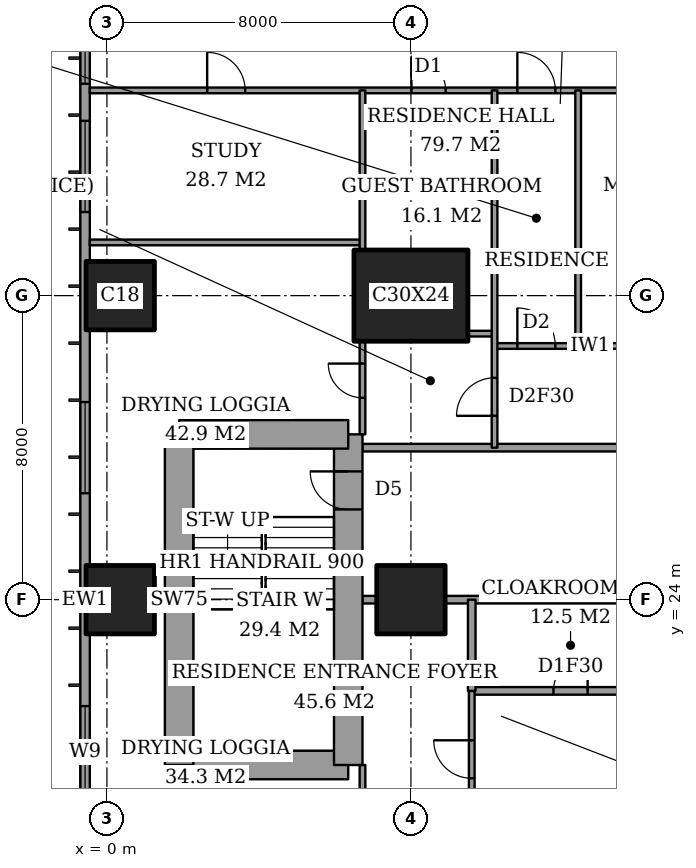
"""IFC4 building model, lengths in metres.
Left out: names, types, materials, properties, quantities, classifications, styles, units other than length and angle.
Written with IfcOpenShell. Run it as: python <this file> out.ifc"""

import sys

from ifc_helpers import new_model, si_unit, direction, frame, frame_2d, origin, origin_2d, place, context, subcontext, project, spatial, rectangle, extrude, element, fill, save


model = new_model("IFC4")
c1 = context("Model", 3, precision=1e-05, world=origin(), true_north=direction((0.0, 1.0)))
c2 = subcontext(c1, "Body", "Model", "MODEL_VIEW")
j1 = project(units=[si_unit("LENGTHUNIT", "METRE"), si_unit("PLANEANGLEUNIT", "RADIAN")], contexts=[c1])
p1 = place(None, origin())
s1 = spatial("IfcSite", under=j1, at=p1, CompositionType="ELEMENT")
p2 = place(p1, origin())
s2 = spatial("IfcBuilding", under=s1, at=p2, CompositionType="ELEMENT")
p3 = place(p2, frame((0.0, 0.0, 196.6)))
s3 = spatial("IfcBuildingStorey", under=s2, at=p3, CompositionType="ELEMENT", Elevation=196.6)
for number, where, z_axis, x_axis in (
    (1, (0.35, 24.0, 0.0), (0.0, 0.0, 1.0), (1.0, 0.0, 0.0)),
    (2, (0.35, 32.0, 0.0), (0.0, 0.0, 1.0), (1.0, 0.0, 0.0)),
    (3, (8.0, 24.0, 0.0), (0.0, 0.0, 1.0), (1.0, 0.0, 0.0)),
):
    element("IfcColumn", number, at=place(p3, frame(where, z_axis=z_axis, x_axis=x_axis)), inside=s3, PredefinedType="COLUMN", context=c2, shape_type="SweptSolid", body=[
        extrude(rectangle(XDim=1.8, YDim=1.8, at=origin_2d()), origin(), (0.0, 0.0, 1.0), 3.6),
    ])
p4 = place(p3, frame((8.0, 32.0, 0.0), z_axis=(0.0, 0.0, 1.0), x_axis=(1.0, 0.0, 0.0)))
e4 = element("IfcColumn", 4, at=p4, inside=s3, PredefinedType="COLUMN", context=c2, shape_type="SweptSolid", body=[
    extrude(rectangle(XDim=3.0, YDim=2.4, at=origin_2d()), origin(), (0.0, 0.0, 1.0), 3.6),
])
p5 = place(p3, frame((1.9, 19.65, 0.0), z_axis=(0.0, 0.0, 1.0), x_axis=(1.0, 0.0, 0.0)))
e5 = element("IfcWall", 5, at=p5, inside=s3, PredefinedType="SHEAR", context=c2, shape_type="SweptSolid", body=[
    extrude(rectangle(XDim=4.45, YDim=0.75, at=frame_2d((2.225, 0.0))), origin(), (0.0, 0.0, 1.0), 3.6),
])
p6 = place(p3, frame((6.35, 19.65, 0.0), z_axis=(0.0, 0.0, 1.0), x_axis=(0.0, 1.0, 0.0)))
e6 = element("IfcWall", 6, at=p6, inside=s3, PredefinedType="SHEAR", context=c2, shape_type="SweptSolid", body=[
    extrude(rectangle(XDim=8.7, YDim=0.75, at=frame_2d((4.35, 0.0))), origin(), (0.0, 0.0, 1.0), 3.6),
])
p7 = place(p6, frame((6.725, 0.0, 0.0)))
e7 = element("IfcOpeningElement", 7, at=p7, cuts=e6, PredefinedType="OPENING", context=c2, shape_type="SweptSolid", body=[
    extrude(rectangle(XDim=1.0, YDim=2.1, at=frame_2d((0.5, 1.05))), frame((0.0, 0.385, 0.0), z_axis=(0.0, -1.0, 0.0), x_axis=(1.0, 0.0, 0.0)), (0.0, 0.0, 1.0), 0.77),
])
p8 = place(p3, frame((6.35, 28.35, 0.0), z_axis=(0.0, 0.0, 1.0), x_axis=(-1.0, 0.0, 0.0)))
e8 = element("IfcWall", 8, at=p8, inside=s3, PredefinedType="SHEAR", context=c2, shape_type="SweptSolid", body=[
    extrude(rectangle(XDim=4.45, YDim=0.75, at=frame_2d((2.225, 0.0))), origin(), (0.0, 0.0, 1.0), 3.6),
])
p9 = place(p3, frame((1.9, 28.35, 0.0), z_axis=(0.0, 0.0, 1.0), x_axis=(0.0, -1.0, 0.0)))
e9 = element("IfcWall", 9, at=p9, inside=s3, PredefinedType="SHEAR", context=c2, shape_type="SweptSolid", body=[
    extrude(rectangle(XDim=8.7, YDim=0.75, at=frame_2d((4.35, 0.0))), origin(), (0.0, 0.0, 1.0), 3.6),
])
p10 = place(p3, frame((-0.575, 44.825, 0.0), z_axis=(0.0, 0.0, 1.0), x_axis=(0.0, -1.0, 0.0)))
e10 = element("IfcWall", 10, at=p10, inside=s3, PredefinedType="SOLIDWALL", context=c2, shape_type="SweptSolid", body=[
    extrude(rectangle(XDim=41.65, YDim=0.25, at=frame_2d((20.825, 0.0))), origin(), (0.0, 0.0, 1.0), 3.6),
])
p11 = place(p10, frame((0.825, 0.0, 0.2)))
e11 = element("IfcOpeningElement", 11, at=p11, cuts=e10, PredefinedType="OPENING", context=c2, shape_type="SweptSolid", body=[
    extrude(rectangle(XDim=2.4, YDim=2.4, at=frame_2d((1.2, 1.2))), frame((0.0, 0.135, 0.0), z_axis=(0.0, -1.0, 0.0), x_axis=(1.0, 0.0, 0.0)), (0.0, 0.0, 1.0), 0.27),
])
p12 = place(p10, frame((6.05, 0.0, 0.2)))
e12 = element("IfcOpeningElement", 12, at=p12, cuts=e10, PredefinedType="OPENING", context=c2, shape_type="SweptSolid", body=[
    extrude(rectangle(XDim=1.2, YDim=2.4, at=frame_2d((0.6, 1.2))), frame((0.0, 0.135, 0.0), z_axis=(0.0, -1.0, 0.0), x_axis=(1.0, 0.0, 0.0)), (0.0, 0.0, 1.0), 0.27),
])
p13 = place(p10, frame((8.225, 0.0, 0.2)))
e13 = element("IfcOpeningElement", 13, at=p13, cuts=e10, PredefinedType="OPENING", context=c2, shape_type="SweptSolid", body=[
    extrude(rectangle(XDim=2.4, YDim=2.4, at=frame_2d((1.2, 1.2))), frame((0.0, 0.135, 0.0), z_axis=(0.0, -1.0, 0.0), x_axis=(1.0, 0.0, 0.0)), (0.0, 0.0, 1.0), 0.27),
])
p14 = place(p10, frame((15.625, 0.0, 0.2)))
e14 = element("IfcOpeningElement", 14, at=p14, cuts=e10, PredefinedType="OPENING", context=c2, shape_type="SweptSolid", body=[
    extrude(rectangle(XDim=2.4, YDim=2.4, at=frame_2d((1.2, 1.2))), frame((0.0, 0.135, 0.0), z_axis=(0.0, -1.0, 0.0), x_axis=(1.0, 0.0, 0.0)), (0.0, 0.0, 1.0), 0.27),
])
p15 = place(p10, frame((23.625, 0.0, 0.2)))
e15 = element("IfcOpeningElement", 15, at=p15, cuts=e10, PredefinedType="OPENING", context=c2, shape_type="SweptSolid", body=[
    extrude(rectangle(XDim=2.4, YDim=2.4, at=frame_2d((1.2, 1.2))), frame((0.0, 0.135, 0.0), z_axis=(0.0, -1.0, 0.0), x_axis=(1.0, 0.0, 0.0)), (0.0, 0.0, 1.0), 0.27),
])
p16 = place(p10, frame((30.775, 0.0, 0.2)))
e16 = element("IfcOpeningElement", 16, at=p16, cuts=e10, PredefinedType="OPENING", context=c2, shape_type="SweptSolid", body=[
    extrude(rectangle(XDim=2.4, YDim=2.4, at=frame_2d((1.2, 1.2))), frame((0.0, 0.135, 0.0), z_axis=(0.0, -1.0, 0.0), x_axis=(1.0, 0.0, 0.0)), (0.0, 0.0, 1.0), 0.27),
])
p17 = place(p10, frame((34.55, 0.0, 0.2)))
e17 = element("IfcOpeningElement", 17, at=p17, cuts=e10, PredefinedType="OPENING", context=c2, shape_type="SweptSolid", body=[
    extrude(rectangle(XDim=1.2, YDim=2.4, at=frame_2d((0.6, 1.2))), frame((0.0, 0.135, 0.0), z_axis=(0.0, -1.0, 0.0), x_axis=(1.0, 0.0, 0.0)), (0.0, 0.0, 1.0), 0.27),
])
p18 = place(p10, frame((38.425, 0.0, 0.2)))
e18 = element("IfcOpeningElement", 18, at=p18, cuts=e10, PredefinedType="OPENING", context=c2, shape_type="SweptSolid", body=[
    extrude(rectangle(XDim=2.4, YDim=2.4, at=frame_2d((1.2, 1.2))), frame((0.0, 0.135, 0.0), z_axis=(0.0, -1.0, 0.0), x_axis=(1.0, 0.0, 0.0)), (0.0, 0.0, 1.0), 0.27),
])
p19 = place(p3, frame((9.6, 21.6, 0.0), z_axis=(0.0, 0.0, 1.0), x_axis=(1.0, 0.0, 0.0)))
e19 = element("IfcWall", 19, at=p19, inside=s3, PredefinedType="PARTITIONING", context=c2, shape_type="SweptSolid", body=[
    extrude(rectangle(XDim=5.2, YDim=0.2, at=frame_2d((2.6, 0.0))), origin(), (0.0, 0.0, 1.0), 3.35),
])
p20 = place(p19, frame((2.15, 0.0, 0.0)))
e20 = element("IfcOpeningElement", 20, at=p20, cuts=e19, PredefinedType="OPENING", context=c2, shape_type="SweptSolid", body=[
    extrude(rectangle(XDim=0.9, YDim=2.1, at=frame_2d((0.45, 1.05))), frame((0.0, 0.11, 0.0), z_axis=(0.0, -1.0, 0.0), x_axis=(1.0, 0.0, 0.0)), (0.0, 0.0, 1.0), 0.22),
])
p21 = place(p3, frame((6.725, 24.0, 0.0), z_axis=(0.0, 0.0, 1.0), x_axis=(1.0, 0.0, 0.0)))
e21 = element("IfcWall", 21, at=p21, inside=s3, PredefinedType="PARTITIONING", context=c2, shape_type="SweptSolid", body=[
    extrude(rectangle(XDim=0.375, YDim=0.2, at=frame_2d((0.188, 0.0))), origin(), (0.0, 0.0, 1.0), 3.35),
])
p22 = place(p3, frame((8.9, 24.0, 0.0), z_axis=(0.0, 0.0, 1.0), x_axis=(1.0, 0.0, 0.0)))
e22 = element("IfcWall", 22, at=p22, inside=s3, PredefinedType="PARTITIONING", context=c2, shape_type="SweptSolid", body=[
    extrude(rectangle(XDim=6.2, YDim=0.2, at=frame_2d((3.1, 0.0))), origin(), (0.0, 0.0, 1.0), 3.35),
])
p23 = place(p3, frame((6.725, 28.0, 0.0), z_axis=(0.0, 0.0, 1.0), x_axis=(1.0, 0.0, 0.0)))
e23 = element("IfcWall", 23, at=p23, inside=s3, PredefinedType="PARTITIONING", context=c2, shape_type="SweptSolid", body=[
    extrude(rectangle(XDim=17.275, YDim=0.2, at=frame_2d((8.637, 0.0))), origin(), (0.0, 0.0, 1.0), 3.35),
])
p24 = place(p23, frame((6.775, 0.0, 0.0)))
e24 = element("IfcOpeningElement", 24, at=p24, cuts=e23, PredefinedType="OPENING", context=c2, shape_type="SweptSolid", body=[
    extrude(rectangle(XDim=1.2, YDim=2.4, at=frame_2d((0.6, 1.2))), frame((0.0, 0.11, 0.0), z_axis=(0.0, -1.0, 0.0), x_axis=(1.0, 0.0, 0.0)), (0.0, 0.0, 1.0), 0.22),
])
p25 = place(p3, frame((10.2, 30.675, 0.0), z_axis=(0.0, 0.0, 1.0), x_axis=(1.0, 0.0, 0.0)))
e25 = element("IfcWall", 25, at=p25, inside=s3, PredefinedType="PARTITIONING", context=c2, shape_type="SweptSolid", body=[
    extrude(rectangle(XDim=4.2, YDim=0.15, at=frame_2d((2.1, 0.0))), origin(), (0.0, 0.0, 1.0), 3.35),
])
p26 = place(p25, frame((0.6, 0.0, 0.0)))
e26 = element("IfcOpeningElement", 26, at=p26, cuts=e25, PredefinedType="OPENING", context=c2, shape_type="SweptSolid", body=[
    extrude(rectangle(XDim=1.0, YDim=2.1, at=frame_2d((0.5, 1.05))), frame((0.0, 0.085, 0.0), z_axis=(0.0, -1.0, 0.0), x_axis=(1.0, 0.0, 0.0)), (0.0, 0.0, 1.0), 0.17),
])
p27 = place(p3, frame((9.5, 31.0, 0.0), z_axis=(0.0, 0.0, 1.0), x_axis=(1.0, 0.0, 0.0)))
e27 = element("IfcWall", 27, at=p27, inside=s3, PredefinedType="PARTITIONING", context=c2, shape_type="SweptSolid", body=[
    extrude(rectangle(XDim=0.7, YDim=0.15, at=frame_2d((0.35, 0.0))), origin(), (0.0, 0.0, 1.0), 3.35),
])
p28 = place(p3, frame((-0.45, 33.4, 0.0), z_axis=(0.0, 0.0, 1.0), x_axis=(1.0, 0.0, 0.0)))
e28 = element("IfcWall", 28, at=p28, inside=s3, PredefinedType="PARTITIONING", context=c2, shape_type="SweptSolid", body=[
    extrude(rectangle(XDim=7.175, YDim=0.15, at=frame_2d((3.587, 0.0))), origin(), (0.0, 0.0, 1.0), 3.35),
])
p29 = place(p3, frame((-0.45, 37.4, 0.0), z_axis=(0.0, 0.0, 1.0), x_axis=(1.0, 0.0, 0.0)))
e29 = element("IfcWall", 29, at=p29, inside=s3, PredefinedType="PARTITIONING", context=c2, shape_type="SweptSolid", body=[
    extrude(rectangle(XDim=25.011, YDim=0.15, at=frame_2d((12.505, 0.0))), origin(), (0.0, 0.0, 1.0), 3.35),
])
p30 = place(p29, frame((11.25, 0.0, 0.0)))
e30 = element("IfcOpeningElement", 30, at=p30, cuts=e29, PredefinedType="OPENING", context=c2, shape_type="SweptSolid", body=[
    extrude(rectangle(XDim=1.0, YDim=2.1, at=frame_2d((0.5, 1.05))), frame((0.0, 0.085, 0.0), z_axis=(0.0, -1.0, 0.0), x_axis=(1.0, 0.0, 0.0)), (0.0, 0.0, 1.0), 0.17),
])
p31 = place(p29, frame((3.087, 0.0, 0.0)))
e31 = element("IfcOpeningElement", 31, at=p31, cuts=e29, PredefinedType="OPENING", context=c2, shape_type="SweptSolid", body=[
    extrude(rectangle(XDim=1.0, YDim=2.1, at=frame_2d((0.5, 1.05))), frame((0.0, 0.085, 0.0), z_axis=(0.0, -1.0, 0.0), x_axis=(1.0, 0.0, 0.0)), (0.0, 0.0, 1.0), 0.17),
])
p32 = place(p29, frame((8.462, 0.0, 0.0)))
e32 = element("IfcOpeningElement", 32, at=p32, cuts=e29, PredefinedType="OPENING", context=c2, shape_type="SweptSolid", body=[
    extrude(rectangle(XDim=0.9, YDim=2.1, at=frame_2d((0.45, 1.05))), frame((0.0, 0.085, 0.0), z_axis=(0.0, -1.0, 0.0), x_axis=(1.0, 0.0, 0.0)), (0.0, 0.0, 1.0), 0.17),
])
p33 = place(p29, frame((15.15, 0.0, 0.0)))
e33 = element("IfcOpeningElement", 33, at=p33, cuts=e29, PredefinedType="OPENING", context=c2, shape_type="SweptSolid", body=[
    extrude(rectangle(XDim=1.0, YDim=2.1, at=frame_2d((0.5, 1.05))), frame((0.0, 0.085, 0.0), z_axis=(0.0, -1.0, 0.0), x_axis=(1.0, 0.0, 0.0)), (0.0, 0.0, 1.0), 0.17),
])
p34 = place(p29, frame((21.175, 0.0, 0.0)))
e34 = element("IfcOpeningElement", 34, at=p34, cuts=e29, PredefinedType="OPENING", context=c2, shape_type="SweptSolid", body=[
    extrude(rectangle(XDim=1.0, YDim=2.1, at=frame_2d((0.5, 1.05))), frame((0.0, 0.085, 0.0), z_axis=(0.0, -1.0, 0.0), x_axis=(1.0, 0.0, 0.0)), (0.0, 0.0, 1.0), 0.17),
])
p35 = place(p3, frame((6.725, 17.2, 0.0), z_axis=(0.0, 0.0, 1.0), x_axis=(0.0, 1.0, 0.0)))
e35 = element("IfcWall", 35, at=p35, inside=s3, PredefinedType="PARTITIONING", context=c2, shape_type="SweptSolid", body=[
    extrude(rectangle(XDim=2.45, YDim=0.15, at=frame_2d((1.225, 0.0))), origin(), (0.0, 0.0, 1.0), 3.35),
])
p36 = place(p35, frame((0.587, 0.0, 0.0)))
e36 = element("IfcOpeningElement", 36, at=p36, cuts=e35, PredefinedType="OPENING", context=c2, shape_type="SweptSolid", body=[
    extrude(rectangle(XDim=0.9, YDim=2.1, at=frame_2d((0.45, 1.05))), frame((0.0, 0.085, 0.0), z_axis=(0.0, -1.0, 0.0), x_axis=(1.0, 0.0, 0.0)), (0.0, 0.0, 1.0), 0.17),
])
p37 = place(p3, frame((6.725, 28.35, 0.0), z_axis=(0.0, 0.0, 1.0), x_axis=(0.0, 1.0, 0.0)))
e37 = element("IfcWall", 37, at=p37, inside=s3, PredefinedType="PARTITIONING", context=c2, shape_type="SweptSolid", body=[
    extrude(rectangle(XDim=2.45, YDim=0.15, at=frame_2d((1.225, 0.0))), origin(), (0.0, 0.0, 1.0), 3.35),
])
p38 = place(p37, frame((0.962, 0.0, 0.0)))
e38 = element("IfcOpeningElement", 38, at=p38, cuts=e37, PredefinedType="OPENING", context=c2, shape_type="SweptSolid", body=[
    extrude(rectangle(XDim=0.9, YDim=2.1, at=frame_2d((0.45, 1.05))), frame((0.0, 0.085, 0.0), z_axis=(0.0, -1.0, 0.0), x_axis=(1.0, 0.0, 0.0)), (0.0, 0.0, 1.0), 0.17),
])
p39 = place(p3, frame((6.725, 33.2, 0.0), z_axis=(0.0, 0.0, 1.0), x_axis=(0.0, 1.0, 0.0)))
e39 = element("IfcWall", 39, at=p39, inside=s3, PredefinedType="PARTITIONING", context=c2, shape_type="SweptSolid", body=[
    extrude(rectangle(XDim=4.2, YDim=0.15, at=frame_2d((2.1, 0.0))), origin(), (0.0, 0.0, 1.0), 3.35),
])
p40 = place(p3, frame((9.6, 21.6, 0.0), z_axis=(0.0, 0.0, 1.0), x_axis=(0.0, 1.0, 0.0)))
e40 = element("IfcWall", 40, at=p40, inside=s3, PredefinedType="PARTITIONING", context=c2, shape_type="SweptSolid", body=[
    extrude(rectangle(XDim=2.4, YDim=0.2, at=frame_2d((1.2, 0.0))), origin(), (0.0, 0.0, 1.0), 3.35),
])
p41 = place(p3, frame((9.6, 10.6, 0.0), z_axis=(0.0, 0.0, 1.0), x_axis=(0.0, 1.0, 0.0)))
e41 = element("IfcWall", 41, at=p41, inside=s3, PredefinedType="PARTITIONING", context=c2, shape_type="SweptSolid", body=[
    extrude(rectangle(XDim=11.0, YDim=0.15, at=frame_2d((5.5, 0.0))), origin(), (0.0, 0.0, 1.0), 3.35),
])
p42 = place(p41, frame((8.7, 0.0, 0.0)))
e42 = element("IfcOpeningElement", 42, at=p42, cuts=e41, PredefinedType="OPENING", context=c2, shape_type="SweptSolid", body=[
    extrude(rectangle(XDim=1.0, YDim=2.1, at=frame_2d((0.5, 1.05))), frame((0.0, 0.085, 0.0), z_axis=(0.0, -1.0, 0.0), x_axis=(1.0, 0.0, 0.0)), (0.0, 0.0, 1.0), 0.17),
])
p43 = place(p3, frame((10.2, 28.0, 0.0), z_axis=(0.0, 0.0, 1.0), x_axis=(0.0, 1.0, 0.0)))
e43 = element("IfcWall", 43, at=p43, inside=s3, PredefinedType="PARTITIONING", context=c2, shape_type="SweptSolid", body=[
    extrude(rectangle(XDim=9.4, YDim=0.15, at=frame_2d((4.7, 0.0))), origin(), (0.0, 0.0, 1.0), 3.35),
])
p44 = place(p43, frame((0.837, 0.0, 0.0)))
e44 = element("IfcOpeningElement", 44, at=p44, cuts=e43, PredefinedType="OPENING", context=c2, shape_type="SweptSolid", body=[
    extrude(rectangle(XDim=1.0, YDim=2.1, at=frame_2d((0.5, 1.05))), frame((0.0, 0.085, 0.0), z_axis=(0.0, -1.0, 0.0), x_axis=(1.0, 0.0, 0.0)), (0.0, 0.0, 1.0), 0.17),
])
p45 = place(p3, frame((12.4, 30.675, 0.0), z_axis=(0.0, 0.0, 1.0), x_axis=(0.0, 1.0, 0.0)))
e45 = element("IfcWall", 45, at=p45, inside=s3, PredefinedType="PARTITIONING", context=c2, shape_type="SweptSolid", body=[
    extrude(rectangle(XDim=6.725, YDim=0.15, at=frame_2d((3.362, 0.0))), origin(), (0.0, 0.0, 1.0), 3.35),
])
p46 = place(p12, origin())
e46 = element("IfcWindow", 46, at=p46, inside=s3, PartitioningType="SINGLE_PANEL", PredefinedType="WINDOW", context=c2, shape_type="SweptSolid", body=[
    extrude(rectangle(XDim=1.2, YDim=2.4, at=frame_2d((0.6, 1.2))), frame((0.0, 0.03, 0.0), z_axis=(0.0, -1.0, 0.0), x_axis=(1.0, 0.0, 0.0)), (0.0, 0.0, 1.0), 0.06),
])
fill(e12, e46)
p47 = place(p13, origin())
e47 = element("IfcWindow", 47, at=p47, inside=s3, PartitioningType="SINGLE_PANEL", PredefinedType="WINDOW", context=c2, shape_type="SweptSolid", body=[
    extrude(rectangle(XDim=2.4, YDim=2.4, at=frame_2d((1.2, 1.2))), frame((0.0, 0.03, 0.0), z_axis=(0.0, -1.0, 0.0), x_axis=(1.0, 0.0, 0.0)), (0.0, 0.0, 1.0), 0.06),
])
fill(e13, e47)
p48 = place(p14, origin())
e48 = element("IfcWindow", 48, at=p48, inside=s3, PartitioningType="SINGLE_PANEL", PredefinedType="WINDOW", context=c2, shape_type="SweptSolid", body=[
    extrude(rectangle(XDim=2.4, YDim=2.4, at=frame_2d((1.2, 1.2))), frame((0.0, 0.03, 0.0), z_axis=(0.0, -1.0, 0.0), x_axis=(1.0, 0.0, 0.0)), (0.0, 0.0, 1.0), 0.06),
])
fill(e14, e48)
p49 = place(p15, origin())
e49 = element("IfcWindow", 49, at=p49, inside=s3, PartitioningType="SINGLE_PANEL", PredefinedType="WINDOW", context=c2, shape_type="SweptSolid", body=[
    extrude(rectangle(XDim=2.4, YDim=2.4, at=frame_2d((1.2, 1.2))), frame((0.0, 0.03, 0.0), z_axis=(0.0, -1.0, 0.0), x_axis=(1.0, 0.0, 0.0)), (0.0, 0.0, 1.0), 0.06),
])
fill(e15, e49)
p50 = place(p42, origin())
e50 = element("IfcDoor", 50, at=p50, inside=s3, OperationType="SINGLE_SWING_LEFT", PredefinedType="DOOR", context=c2, shape_type="SweptSolid", body=[
    extrude(rectangle(XDim=1.0, YDim=2.1, at=frame_2d((0.5, 1.05))), frame((0.0, 0.025, 0.0), z_axis=(0.0, -1.0, 0.0), x_axis=(1.0, 0.0, 0.0)), (0.0, 0.0, 1.0), 0.05),
])
fill(e42, e50)
p51 = place(p20, origin())
e51 = element("IfcDoor", 51, at=p51, inside=s3, OperationType="SINGLE_SWING_LEFT", PredefinedType="DOOR", context=c2, shape_type="SweptSolid", body=[
    extrude(rectangle(XDim=0.9, YDim=2.1, at=frame_2d((0.45, 1.05))), frame((0.0, 0.025, 0.0), z_axis=(0.0, -1.0, 0.0), x_axis=(1.0, 0.0, 0.0)), (0.0, 0.0, 1.0), 0.05),
])
fill(e20, e51)
p52 = place(p30, origin())
e52 = element("IfcDoor", 52, at=p52, inside=s3, OperationType="SINGLE_SWING_RIGHT", PredefinedType="DOOR", context=c2, shape_type="SweptSolid", body=[
    extrude(rectangle(XDim=1.0, YDim=2.1, at=frame_2d((0.5, 1.05))), frame((0.0, 0.025, 0.0), z_axis=(0.0, -1.0, 0.0), x_axis=(1.0, 0.0, 0.0)), (0.0, 0.0, 1.0), 0.05),
])
fill(e30, e52)
p53 = place(p31, origin())
e53 = element("IfcDoor", 53, at=p53, inside=s3, OperationType="SINGLE_SWING_RIGHT", PredefinedType="DOOR", context=c2, shape_type="SweptSolid", body=[
    extrude(rectangle(XDim=1.0, YDim=2.1, at=frame_2d((0.5, 1.05))), frame((0.0, 0.025, 0.0), z_axis=(0.0, -1.0, 0.0), x_axis=(1.0, 0.0, 0.0)), (0.0, 0.0, 1.0), 0.05),
])
fill(e31, e53)
p54 = place(p38, origin())
e54 = element("IfcDoor", 54, at=p54, inside=s3, OperationType="SINGLE_SWING_LEFT", PredefinedType="DOOR", context=c2, shape_type="SweptSolid", body=[
    extrude(rectangle(XDim=0.9, YDim=2.1, at=frame_2d((0.45, 1.05))), frame((0.0, 0.025, 0.0), z_axis=(0.0, -1.0, 0.0), x_axis=(1.0, 0.0, 0.0)), (0.0, 0.0, 1.0), 0.05),
])
fill(e38, e54)
p55 = place(p32, origin())
e55 = element("IfcDoor", 55, at=p55, inside=s3, OperationType="SINGLE_SWING_RIGHT", PredefinedType="DOOR", context=c2, shape_type="SweptSolid", body=[
    extrude(rectangle(XDim=0.9, YDim=2.1, at=frame_2d((0.45, 1.05))), frame((0.0, 0.025, 0.0), z_axis=(0.0, -1.0, 0.0), x_axis=(1.0, 0.0, 0.0)), (0.0, 0.0, 1.0), 0.05),
])
fill(e32, e55)
p56 = place(p44, origin())
e56 = element("IfcDoor", 56, at=p56, inside=s3, OperationType="SINGLE_SWING_RIGHT", PredefinedType="DOOR", context=c2, shape_type="SweptSolid", body=[
    extrude(rectangle(XDim=1.0, YDim=2.1, at=frame_2d((0.5, 1.05))), frame((0.0, 0.025, 0.0), z_axis=(0.0, -1.0, 0.0), x_axis=(1.0, 0.0, 0.0)), (0.0, 0.0, 1.0), 0.05),
])
fill(e44, e56)
p57 = place(p26, origin())
e57 = element("IfcDoor", 57, at=p57, inside=s3, OperationType="SINGLE_SWING_RIGHT", PredefinedType="DOOR", context=c2, shape_type="SweptSolid", body=[
    extrude(rectangle(XDim=1.0, YDim=2.1, at=frame_2d((0.5, 1.05))), frame((0.0, 0.025, 0.0), z_axis=(0.0, -1.0, 0.0), x_axis=(1.0, 0.0, 0.0)), (0.0, 0.0, 1.0), 0.05),
])
fill(e26, e57)
p58 = place(p7, origin())
e58 = element("IfcDoor", 58, at=p58, inside=s3, OperationType="SINGLE_SWING_LEFT", PredefinedType="DOOR", context=c2, shape_type="SweptSolid", body=[
    extrude(rectangle(XDim=1.0, YDim=2.1, at=frame_2d((0.5, 1.05))), frame((0.0, 0.025, 0.0), z_axis=(0.0, -1.0, 0.0), x_axis=(1.0, 0.0, 0.0)), (0.0, 0.0, 1.0), 0.05),
])
fill(e7, e58)
save(model, sys.argv[1])
